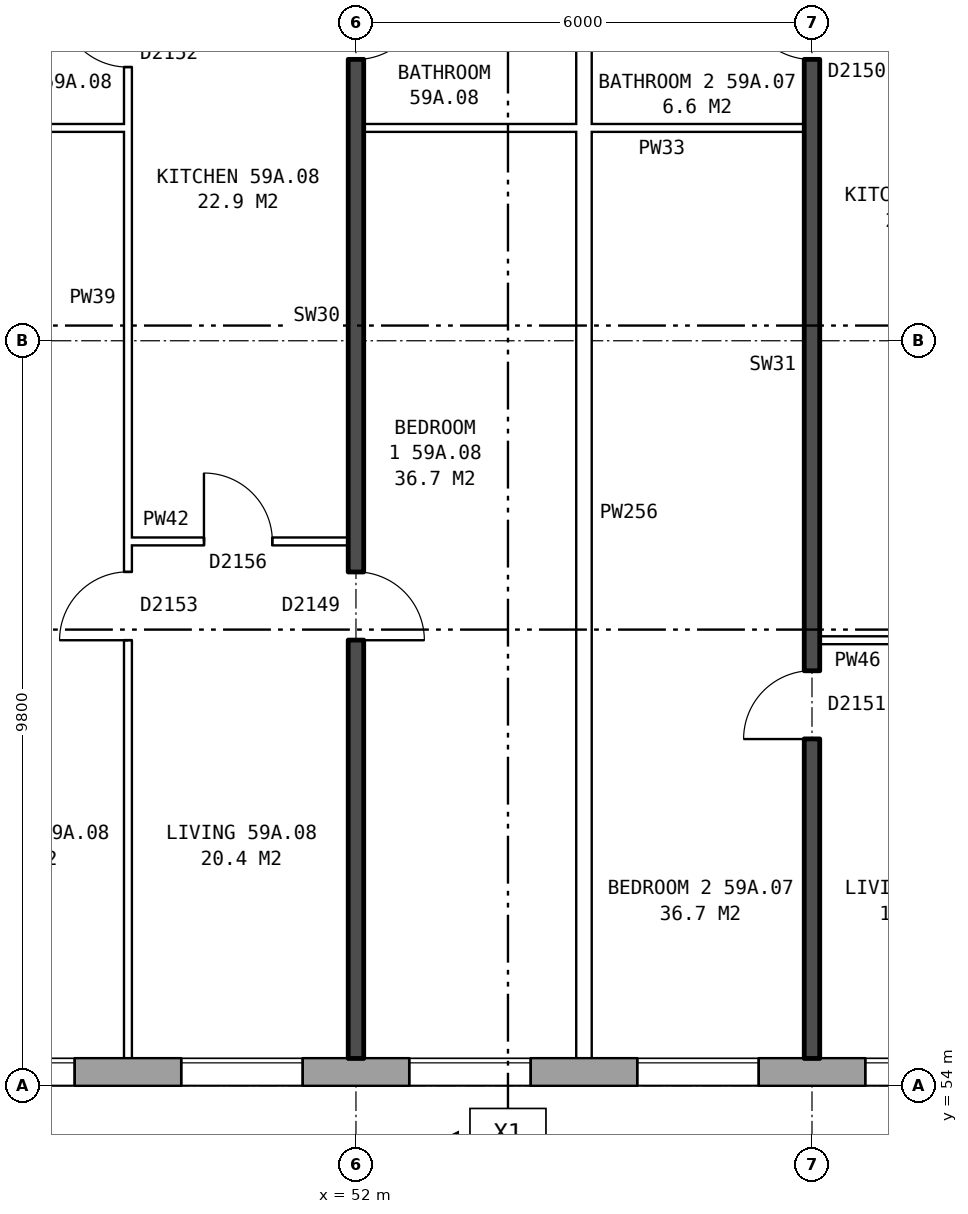
"""IFC4 building model, lengths in metres.
Left out: names, types, materials, properties, quantities, classifications, styles, units other than length and angle.
Written with IfcOpenShell. Run it as: python <this file> out.ifc"""

import sys

from ifc_helpers import new_model, si_unit, direction, frame, frame_2d, origin, place, context, subcontext, project, spatial, rectangle, extrude, element, fill, save


model = new_model("IFC4")
c1 = context("Model", 3, precision=1e-05, world=origin(), true_north=direction((0.0, 1.0)))
c2 = subcontext(c1, "Body", "Model", "MODEL_VIEW")
j1 = project(units=[si_unit("LENGTHUNIT", "METRE"), si_unit("PLANEANGLEUNIT", "RADIAN")], contexts=[c1])
p1 = place(None, origin())
s1 = spatial("IfcSite", under=j1, at=p1, CompositionType="ELEMENT")
p2 = place(p1, origin())
s2 = spatial("IfcBuilding", under=s1, at=p2, CompositionType="ELEMENT")
p3 = place(p2, frame((0.0, 0.0, 209.0)))
s3 = spatial("IfcBuildingStorey", under=s2, at=p3, CompositionType="ELEMENT", Elevation=209.0)
p4 = place(p3, frame((35.075, 54.18, 0.0), z_axis=(0.0, 0.0, 1.0), x_axis=(1.0, 0.0, 0.0)))
e1 = element("IfcWall", 1, at=p4, inside=s3, PredefinedType="STANDARD", context=c2, shape_type="SweptSolid", body=[
    extrude(rectangle(XDim=39.875, YDim=0.36, at=frame_2d((19.938, 0.0))), origin(), (0.0, 0.0, 1.0), 2.85),
])
p5 = place(p4, frame((0.3, 0.0, 0.8)))
e2 = element("IfcOpeningElement", 2, at=p5, cuts=e1, PredefinedType="OPENING", context=c2, shape_type="SweptSolid", body=[
    extrude(rectangle(XDim=1.0, YDim=1.8, at=frame_2d((0.5, 0.9))), frame((0.0, 0.19, 0.0), z_axis=(0.0, -1.0, 0.0), x_axis=(1.0, 0.0, 0.0)), (0.0, 0.0, 1.0), 0.38),
])
p6 = place(p4, frame((5.625, 0.0, 0.8)))
e3 = element("IfcOpeningElement", 3, at=p6, cuts=e1, PredefinedType="OPENING", context=c2, shape_type="SweptSolid", body=[
    extrude(rectangle(XDim=1.6, YDim=1.8, at=frame_2d((0.8, 0.9))), frame((0.0, 0.19, 0.0), z_axis=(0.0, -1.0, 0.0), x_axis=(1.0, 0.0, 0.0)), (0.0, 0.0, 1.0), 0.38),
])
p7 = place(p4, frame((8.625, 0.0, 0.8)))
e4 = element("IfcOpeningElement", 4, at=p7, cuts=e1, PredefinedType="OPENING", context=c2, shape_type="SweptSolid", body=[
    extrude(rectangle(XDim=1.6, YDim=1.8, at=frame_2d((0.8, 0.9))), frame((0.0, 0.19, 0.0), z_axis=(0.0, -1.0, 0.0), x_axis=(1.0, 0.0, 0.0)), (0.0, 0.0, 1.0), 0.38),
])
p8 = place(p4, frame((11.625, 0.0, 0.8)))
e5 = element("IfcOpeningElement", 5, at=p8, cuts=e1, PredefinedType="OPENING", context=c2, shape_type="SweptSolid", body=[
    extrude(rectangle(XDim=1.6, YDim=1.8, at=frame_2d((0.8, 0.9))), frame((0.0, 0.19, 0.0), z_axis=(0.0, -1.0, 0.0), x_axis=(1.0, 0.0, 0.0)), (0.0, 0.0, 1.0), 0.38),
])
p9 = place(p4, frame((14.625, 0.0, 0.8)))
e6 = element("IfcOpeningElement", 6, at=p9, cuts=e1, PredefinedType="OPENING", context=c2, shape_type="SweptSolid", body=[
    extrude(rectangle(XDim=1.6, YDim=1.8, at=frame_2d((0.8, 0.9))), frame((0.0, 0.19, 0.0), z_axis=(0.0, -1.0, 0.0), x_axis=(1.0, 0.0, 0.0)), (0.0, 0.0, 1.0), 0.38),
])
p10 = place(p4, frame((17.625, 0.0, 0.8)))
e7 = element("IfcOpeningElement", 7, at=p10, cuts=e1, PredefinedType="OPENING", context=c2, shape_type="SweptSolid", body=[
    extrude(rectangle(XDim=1.6, YDim=1.8, at=frame_2d((0.8, 0.9))), frame((0.0, 0.19, 0.0), z_axis=(0.0, -1.0, 0.0), x_axis=(1.0, 0.0, 0.0)), (0.0, 0.0, 1.0), 0.38),
])
p11 = place(p4, frame((20.625, 0.0, 0.8)))
e8 = element("IfcOpeningElement", 8, at=p11, cuts=e1, PredefinedType="OPENING", context=c2, shape_type="SweptSolid", body=[
    extrude(rectangle(XDim=1.6, YDim=1.8, at=frame_2d((0.8, 0.9))), frame((0.0, 0.19, 0.0), z_axis=(0.0, -1.0, 0.0), x_axis=(1.0, 0.0, 0.0)), (0.0, 0.0, 1.0), 0.38),
])
p12 = place(p4, frame((23.625, 0.0, 0.8)))
e9 = element("IfcOpeningElement", 9, at=p12, cuts=e1, PredefinedType="OPENING", context=c2, shape_type="SweptSolid", body=[
    extrude(rectangle(XDim=1.6, YDim=1.8, at=frame_2d((0.8, 0.9))), frame((0.0, 0.19, 0.0), z_axis=(0.0, -1.0, 0.0), x_axis=(1.0, 0.0, 0.0)), (0.0, 0.0, 1.0), 0.38),
])
p13 = place(p4, frame((26.625, 0.0, 0.8)))
e10 = element("IfcOpeningElement", 10, at=p13, cuts=e1, PredefinedType="OPENING", context=c2, shape_type="SweptSolid", body=[
    extrude(rectangle(XDim=1.6, YDim=1.8, at=frame_2d((0.8, 0.9))), frame((0.0, 0.19, 0.0), z_axis=(0.0, -1.0, 0.0), x_axis=(1.0, 0.0, 0.0)), (0.0, 0.0, 1.0), 0.38),
])
p14 = place(p4, frame((29.625, 0.0, 0.8)))
e11 = element("IfcOpeningElement", 11, at=p14, cuts=e1, PredefinedType="OPENING", context=c2, shape_type="SweptSolid", body=[
    extrude(rectangle(XDim=1.6, YDim=1.8, at=frame_2d((0.8, 0.9))), frame((0.0, 0.19, 0.0), z_axis=(0.0, -1.0, 0.0), x_axis=(1.0, 0.0, 0.0)), (0.0, 0.0, 1.0), 0.38),
])
p15 = place(p4, frame((32.625, 0.0, 0.8)))
e12 = element("IfcOpeningElement", 12, at=p15, cuts=e1, PredefinedType="OPENING", context=c2, shape_type="SweptSolid", body=[
    extrude(rectangle(XDim=1.6, YDim=1.8, at=frame_2d((0.8, 0.9))), frame((0.0, 0.19, 0.0), z_axis=(0.0, -1.0, 0.0), x_axis=(1.0, 0.0, 0.0)), (0.0, 0.0, 1.0), 0.38),
])
p16 = place(p4, frame((36.325, 0.0, 1.1)))
e13 = element("IfcOpeningElement", 13, at=p16, cuts=e1, PredefinedType="OPENING", context=c2, shape_type="SweptSolid", body=[
    extrude(rectangle(XDim=0.8, YDim=1.5, at=frame_2d((0.4, 0.75))), frame((0.0, 0.19, 0.0), z_axis=(0.0, -1.0, 0.0), x_axis=(1.0, 0.0, 0.0)), (0.0, 0.0, 1.0), 0.38),
])
p17 = place(p4, frame((3.65, 0.0, 0.8)))
e14 = element("IfcOpeningElement", 14, at=p17, cuts=e1, PredefinedType="OPENING", context=c2, shape_type="SweptSolid", body=[
    extrude(rectangle(XDim=1.0, YDim=1.8, at=frame_2d((0.5, 0.9))), frame((0.0, 0.19, 0.0), z_axis=(0.0, -1.0, 0.0), x_axis=(1.0, 0.0, 0.0)), (0.0, 0.0, 1.0), 0.38),
])
p18 = place(p4, frame((37.425, 0.0, 0.8)))
e15 = element("IfcOpeningElement", 15, at=p18, cuts=e1, PredefinedType="OPENING", context=c2, shape_type="SweptSolid", body=[
    extrude(rectangle(XDim=1.4, YDim=1.8, at=frame_2d((0.7, 0.9))), frame((0.0, 0.19, 0.0), z_axis=(0.0, -1.0, 0.0), x_axis=(1.0, 0.0, 0.0)), (0.0, 0.0, 1.0), 0.38),
])
p19 = place(p3, frame((58.1, 59.86, 0.0), z_axis=(0.0, 0.0, 1.0), x_axis=(1.0, 0.0, 0.0)))
e16 = element("IfcWall", 16, at=p19, inside=s3, PredefinedType="PARTITIONING", context=c2, shape_type="SweptSolid", body=[
    extrude(rectangle(XDim=2.9, YDim=0.1, at=frame_2d((1.45, 0.0))), origin(), (0.0, 0.0, 1.0), 2.85),
])
p20 = place(p19, frame((1.0, 0.0, 0.0)))
e17 = element("IfcOpeningElement", 17, at=p20, cuts=e16, PredefinedType="OPENING", context=c2, shape_type="SweptSolid", body=[
    extrude(rectangle(XDim=0.9, YDim=2.1, at=frame_2d((0.45, 1.05))), frame((0.0, 0.06, 0.0), z_axis=(0.0, -1.0, 0.0), x_axis=(1.0, 0.0, 0.0)), (0.0, 0.0, 1.0), 0.12),
])
p21 = place(p3, frame((49.0, 61.16, 0.0), z_axis=(0.0, 0.0, 1.0), x_axis=(1.0, 0.0, 0.0)))
e18 = element("IfcWall", 18, at=p21, inside=s3, PredefinedType="PARTITIONING", context=c2, shape_type="SweptSolid", body=[
    extrude(rectangle(XDim=2.9, YDim=0.1, at=frame_2d((1.45, 0.0))), origin(), (0.0, 0.0, 1.0), 2.85),
])
p22 = place(p21, frame((1.0, 0.0, 0.0)))
e19 = element("IfcOpeningElement", 19, at=p22, cuts=e18, PredefinedType="OPENING", context=c2, shape_type="SweptSolid", body=[
    extrude(rectangle(XDim=0.9, YDim=2.1, at=frame_2d((0.45, 1.05))), frame((0.0, 0.06, 0.0), z_axis=(0.0, -1.0, 0.0), x_axis=(1.0, 0.0, 0.0)), (0.0, 0.0, 1.0), 0.12),
])
p23 = place(p3, frame((46.1, 66.6, 0.0), z_axis=(0.0, 0.0, 1.0), x_axis=(1.0, 0.0, 0.0)))
e20 = element("IfcWall", 20, at=p23, inside=s3, PredefinedType="PARTITIONING", context=c2, shape_type="SweptSolid", body=[
    extrude(rectangle(XDim=2.9, YDim=0.1, at=frame_2d((1.45, 0.0))), origin(), (0.0, 0.0, 1.0), 2.85),
])
p24 = place(p3, frame((52.1, 66.6, 0.0), z_axis=(0.0, 0.0, 1.0), x_axis=(1.0, 0.0, 0.0)))
e21 = element("IfcWall", 21, at=p24, inside=s3, PredefinedType="PARTITIONING", context=c2, shape_type="SweptSolid", body=[
    extrude(rectangle(XDim=5.8, YDim=0.1, at=frame_2d((2.9, 0.0))), origin(), (0.0, 0.0, 1.0), 2.85),
])
p25 = place(p3, frame((49.0, 54.36, 0.0), z_axis=(0.0, 0.0, 1.0), x_axis=(0.0, 1.0, 0.0)))
e22 = element("IfcWall", 22, at=p25, inside=s3, PredefinedType="PARTITIONING", context=c2, shape_type="SweptSolid", body=[
    extrude(rectangle(XDim=14.34, YDim=0.1, at=frame_2d((7.17, 0.0))), origin(), (0.0, 0.0, 1.0), 2.85),
])
p26 = place(p25, frame((5.5, 0.0, 0.0)))
e23 = element("IfcOpeningElement", 23, at=p26, cuts=e22, PredefinedType="OPENING", context=c2, shape_type="SweptSolid", body=[
    extrude(rectangle(XDim=0.9, YDim=2.1, at=frame_2d((0.45, 1.05))), frame((0.0, 0.06, 0.0), z_axis=(0.0, -1.0, 0.0), x_axis=(1.0, 0.0, 0.0)), (0.0, 0.0, 1.0), 0.12),
])
p27 = place(p25, frame((13.04, 0.0, 0.0)))
e24 = element("IfcOpeningElement", 24, at=p27, cuts=e22, PredefinedType="OPENING", context=c2, shape_type="SweptSolid", body=[
    extrude(rectangle(XDim=0.9, YDim=2.1, at=frame_2d((0.45, 1.05))), frame((0.0, 0.06, 0.0), z_axis=(0.0, -1.0, 0.0), x_axis=(1.0, 0.0, 0.0)), (0.0, 0.0, 1.0), 0.12),
])
p28 = place(p3, frame((52.0, 54.36, 0.0), z_axis=(0.0, 0.0, 1.0), x_axis=(0.0, 1.0, 0.0)))
e25 = element("IfcWall", 25, at=p28, inside=s3, PredefinedType="SOLIDWALL", context=c2, shape_type="SweptSolid", body=[
    extrude(rectangle(XDim=14.44, YDim=0.2, at=frame_2d((7.22, 0.0))), origin(), (0.0, 0.0, 1.0), 2.85),
])
p29 = place(p28, frame((5.5, 0.0, 0.0)))
e26 = element("IfcOpeningElement", 26, at=p29, cuts=e25, PredefinedType="OPENING", context=c2, shape_type="SweptSolid", body=[
    extrude(rectangle(XDim=0.9, YDim=2.1, at=frame_2d((0.45, 1.05))), frame((0.0, 0.11, 0.0), z_axis=(0.0, -1.0, 0.0), x_axis=(1.0, 0.0, 0.0)), (0.0, 0.0, 1.0), 0.22),
])
p30 = place(p28, frame((13.14, 0.0, 0.0)))
e27 = element("IfcOpeningElement", 27, at=p30, cuts=e25, PredefinedType="OPENING", context=c2, shape_type="SweptSolid", body=[
    extrude(rectangle(XDim=0.9, YDim=2.1, at=frame_2d((0.45, 1.05))), frame((0.0, 0.11, 0.0), z_axis=(0.0, -1.0, 0.0), x_axis=(1.0, 0.0, 0.0)), (0.0, 0.0, 1.0), 0.22),
])
p31 = place(p3, frame((55.0, 54.36, 0.0), z_axis=(0.0, 0.0, 1.0), x_axis=(0.0, 1.0, 0.0)))
e28 = element("IfcWall", 28, at=p31, inside=s3, PredefinedType="PARTITIONING", context=c2, shape_type="SweptSolid", body=[
    extrude(rectangle(XDim=14.34, YDim=0.2, at=frame_2d((7.17, 0.0))), origin(), (0.0, 0.0, 1.0), 2.85),
])
p32 = place(p3, frame((58.0, 54.36, 0.0), z_axis=(0.0, 0.0, 1.0), x_axis=(0.0, 1.0, 0.0)))
e29 = element("IfcWall", 29, at=p32, inside=s3, PredefinedType="SOLIDWALL", context=c2, shape_type="SweptSolid", body=[
    extrude(rectangle(XDim=14.44, YDim=0.2, at=frame_2d((7.22, 0.0))), origin(), (0.0, 0.0, 1.0), 2.85),
])
p33 = place(p32, frame((4.2, 0.0, 0.0)))
e30 = element("IfcOpeningElement", 30, at=p33, cuts=e29, PredefinedType="OPENING", context=c2, shape_type="SweptSolid", body=[
    extrude(rectangle(XDim=0.9, YDim=2.1, at=frame_2d((0.45, 1.05))), frame((0.0, 0.11, 0.0), z_axis=(0.0, -1.0, 0.0), x_axis=(1.0, 0.0, 0.0)), (0.0, 0.0, 1.0), 0.22),
])
p34 = place(p32, frame((13.14, 0.0, 0.0)))
e31 = element("IfcOpeningElement", 31, at=p34, cuts=e29, PredefinedType="OPENING", context=c2, shape_type="SweptSolid", body=[
    extrude(rectangle(XDim=0.9, YDim=2.1, at=frame_2d((0.45, 1.05))), frame((0.0, 0.11, 0.0), z_axis=(0.0, -1.0, 0.0), x_axis=(1.0, 0.0, 0.0)), (0.0, 0.0, 1.0), 0.22),
])
p35 = place(p8, origin())
e32 = element("IfcWindow", 32, at=p35, inside=s3, PartitioningType="SINGLE_PANEL", PredefinedType="WINDOW", context=c2, shape_type="SweptSolid", body=[
    extrude(rectangle(XDim=1.6, YDim=1.8, at=frame_2d((0.8, 0.9))), frame((0.0, 0.15, 0.0), z_axis=(0.0, -1.0, 0.0), x_axis=(1.0, 0.0, 0.0)), (0.0, 0.0, 1.0), 0.06),
])
fill(e5, e32)
p36 = place(p9, origin())
e33 = element("IfcWindow", 33, at=p36, inside=s3, PartitioningType="SINGLE_PANEL", PredefinedType="WINDOW", context=c2, shape_type="SweptSolid", body=[
    extrude(rectangle(XDim=1.6, YDim=1.8, at=frame_2d((0.8, 0.9))), frame((0.0, 0.15, 0.0), z_axis=(0.0, -1.0, 0.0), x_axis=(1.0, 0.0, 0.0)), (0.0, 0.0, 1.0), 0.06),
])
fill(e6, e33)
p37 = place(p10, origin())
e34 = element("IfcWindow", 34, at=p37, inside=s3, PartitioningType="SINGLE_PANEL", PredefinedType="WINDOW", context=c2, shape_type="SweptSolid", body=[
    extrude(rectangle(XDim=1.6, YDim=1.8, at=frame_2d((0.8, 0.9))), frame((0.0, 0.15, 0.0), z_axis=(0.0, -1.0, 0.0), x_axis=(1.0, 0.0, 0.0)), (0.0, 0.0, 1.0), 0.06),
])
fill(e7, e34)
p38 = place(p11, origin())
e35 = element("IfcWindow", 35, at=p38, inside=s3, PartitioningType="SINGLE_PANEL", PredefinedType="WINDOW", context=c2, shape_type="SweptSolid", body=[
    extrude(rectangle(XDim=1.6, YDim=1.8, at=frame_2d((0.8, 0.9))), frame((0.0, 0.15, 0.0), z_axis=(0.0, -1.0, 0.0), x_axis=(1.0, 0.0, 0.0)), (0.0, 0.0, 1.0), 0.06),
])
fill(e8, e35)
p39 = place(p12, origin())
e36 = element("IfcWindow", 36, at=p39, inside=s3, PartitioningType="SINGLE_PANEL", PredefinedType="WINDOW", context=c2, shape_type="SweptSolid", body=[
    extrude(rectangle(XDim=1.6, YDim=1.8, at=frame_2d((0.8, 0.9))), frame((0.0, 0.15, 0.0), z_axis=(0.0, -1.0, 0.0), x_axis=(1.0, 0.0, 0.0)), (0.0, 0.0, 1.0), 0.06),
])
fill(e9, e36)
p40 = place(p33, origin())
e37 = element("IfcDoor", 37, at=p40, inside=s3, OperationType="SINGLE_SWING_LEFT", PredefinedType="DOOR", context=c2, shape_type="SweptSolid", body=[
    extrude(rectangle(XDim=0.9, YDim=2.1, at=frame_2d((0.45, 1.05))), frame((0.0, 0.025, 0.0), z_axis=(0.0, -1.0, 0.0), x_axis=(1.0, 0.0, 0.0)), (0.0, 0.0, 1.0), 0.05),
])
fill(e30, e37)
p41 = place(p34, origin())
e38 = element("IfcDoor", 38, at=p41, inside=s3, OperationType="SINGLE_SWING_RIGHT", PredefinedType="DOOR", context=c2, shape_type="SweptSolid", body=[
    extrude(rectangle(XDim=0.9, YDim=2.1, at=frame_2d((0.45, 1.05))), frame((0.0, 0.025, 0.0), z_axis=(0.0, -1.0, 0.0), x_axis=(1.0, 0.0, 0.0)), (0.0, 0.0, 1.0), 0.05),
])
fill(e31, e38)
p42 = place(p29, frame((0.9, 0.0, 0.0), z_axis=(0.0, 0.0, 1.0), x_axis=(-1.0, 0.0, 0.0)))
e39 = element("IfcDoor", 39, at=p42, inside=s3, OperationType="SINGLE_SWING_RIGHT", PredefinedType="DOOR", context=c2, shape_type="SweptSolid", body=[
    extrude(rectangle(XDim=0.9, YDim=2.1, at=frame_2d((0.45, 1.05))), frame((0.0, 0.025, 0.0), z_axis=(0.0, -1.0, 0.0), x_axis=(1.0, 0.0, 0.0)), (0.0, 0.0, 1.0), 0.05),
])
fill(e26, e39)
p43 = place(p26, origin())
e40 = element("IfcDoor", 40, at=p43, inside=s3, OperationType="SINGLE_SWING_LEFT", PredefinedType="DOOR", context=c2, shape_type="SweptSolid", body=[
    extrude(rectangle(XDim=0.9, YDim=2.1, at=frame_2d((0.45, 1.05))), frame((0.0, 0.025, 0.0), z_axis=(0.0, -1.0, 0.0), x_axis=(1.0, 0.0, 0.0)), (0.0, 0.0, 1.0), 0.05),
])
fill(e23, e40)
p44 = place(p22, origin())
e41 = element("IfcDoor", 41, at=p44, inside=s3, OperationType="SINGLE_SWING_LEFT", PredefinedType="DOOR", context=c2, shape_type="SweptSolid", body=[
    extrude(rectangle(XDim=0.9, YDim=2.1, at=frame_2d((0.45, 1.05))), frame((0.0, 0.025, 0.0), z_axis=(0.0, -1.0, 0.0), x_axis=(1.0, 0.0, 0.0)), (0.0, 0.0, 1.0), 0.05),
])
fill(e19, e41)
p45 = place(p30, frame((0.9, 0.0, 0.0), z_axis=(0.0, 0.0, 1.0), x_axis=(-1.0, 0.0, 0.0)))
e42 = element("IfcDoor", 42, at=p45, inside=s3, OperationType="SINGLE_SWING_LEFT", PredefinedType="DOOR", context=c2, shape_type="SweptSolid", body=[
    extrude(rectangle(XDim=0.9, YDim=2.1, at=frame_2d((0.45, 1.05))), frame((0.0, 0.025, 0.0), z_axis=(0.0, -1.0, 0.0), x_axis=(1.0, 0.0, 0.0)), (0.0, 0.0, 1.0), 0.05),
])
fill(e27, e42)
p46 = place(p27, origin())
e43 = element("IfcDoor", 43, at=p46, inside=s3, OperationType="SINGLE_SWING_RIGHT", PredefinedType="DOOR", context=c2, shape_type="SweptSolid", body=[
    extrude(rectangle(XDim=0.9, YDim=2.1, at=frame_2d((0.45, 1.05))), frame((0.0, 0.025, 0.0), z_axis=(0.0, -1.0, 0.0), x_axis=(1.0, 0.0, 0.0)), (0.0, 0.0, 1.0), 0.05),
])
fill(e24, e43)
save(model, sys.argv[1])
